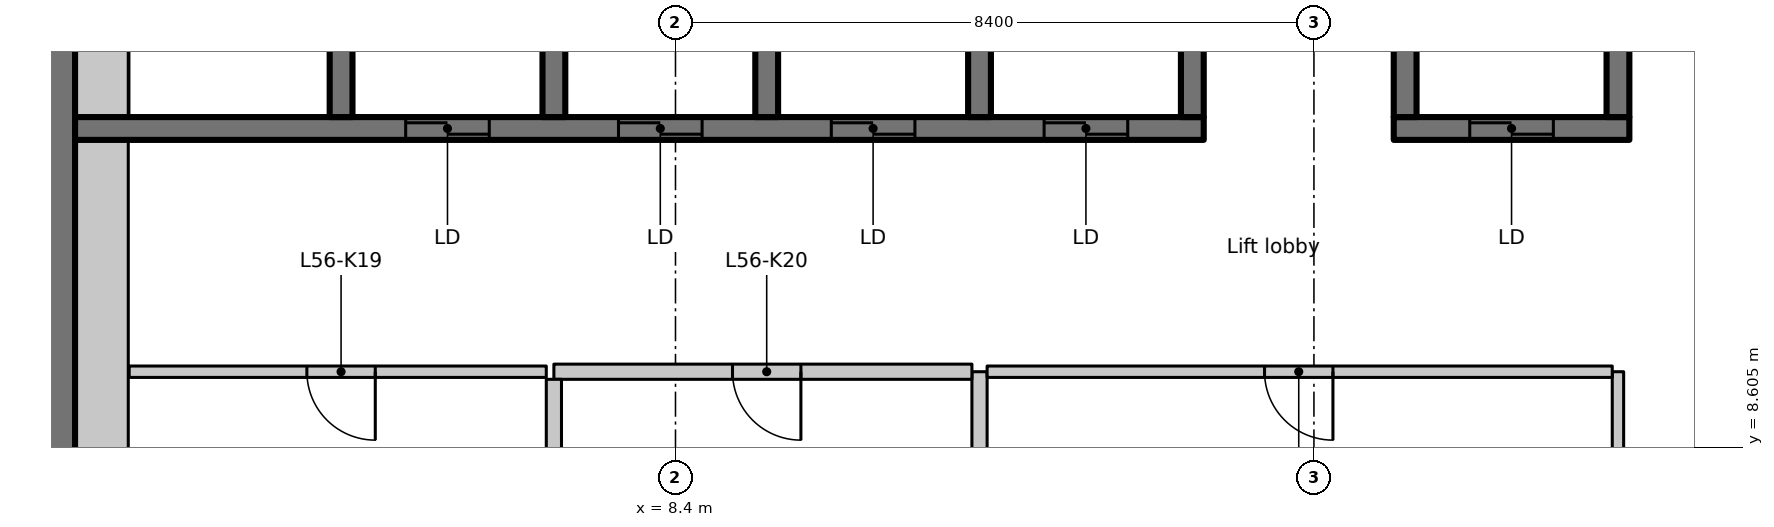
"""IFC4 building model, lengths in metres.
Left out: names, types, materials, properties, quantities, classifications, styles, units other than length and angle.
Written with IfcOpenShell. Run it as: python <this file> out.ifc"""

import sys

from ifc_helpers import new_model, si_unit, direction, frame, frame_2d, origin, place, context, subcontext, project, spatial, rectangle, extrude, element, fill, save


model = new_model("IFC4")
c1 = context("Model", 3, precision=1e-05, world=origin(), true_north=direction((0.0, 1.0)))
c2 = subcontext(c1, "Body", "Model", "MODEL_VIEW")
j1 = project(units=[si_unit("LENGTHUNIT", "METRE"), si_unit("PLANEANGLEUNIT", "RADIAN")], contexts=[c1])
p1 = place(None, origin())
s1 = spatial("IfcSite", under=j1, at=p1, CompositionType="ELEMENT")
p2 = place(p1, origin())
s2 = spatial("IfcBuilding", under=s1, at=p2, CompositionType="ELEMENT")
p3 = place(p2, frame((0.0, 0.0, 222.9)))
s3 = spatial("IfcBuildingStorey", under=s2, at=p3, CompositionType="ELEMENT", Elevation=222.9)
p4 = place(p3, frame((0.25, 7.436, 0.0), z_axis=(0.0, 0.0, 1.0), x_axis=(0.0, 1.0, 0.0)))
e1 = element("IfcWall", 1, at=p4, inside=s3, PredefinedType="SHEAR", context=c2, shape_type="SweptSolid", body=[
    extrude(rectangle(XDim=8.864, YDim=0.5, at=frame_2d((4.432, 0.0))), origin(), (0.0, 0.0, 1.0), 3.35),
])
p5 = place(p3, frame((0.5, 12.8, 0.0), z_axis=(0.0, 0.0, 1.0), x_axis=(1.0, 0.0, 0.0)))
e2 = element("IfcWall", 2, at=p5, inside=s3, PredefinedType="SHEAR", context=c2, shape_type="SweptSolid", body=[
    extrude(rectangle(XDim=14.85, YDim=0.3, at=frame_2d((7.425, 0.0))), origin(), (0.0, 0.0, 1.0), 3.35),
])
p6 = place(p5, frame((4.35, 0.0, 0.0)))
e3 = element("IfcOpeningElement", 3, at=p6, cuts=e2, PredefinedType="OPENING", context=c2, shape_type="SweptSolid", body=[
    extrude(rectangle(XDim=1.1, YDim=2.3, at=frame_2d((0.55, 1.15))), frame((0.0, 0.16, 0.0), z_axis=(0.0, -1.0, 0.0), x_axis=(1.0, 0.0, 0.0)), (0.0, 0.0, 1.0), 0.32),
])
p7 = place(p5, frame((7.15, 0.0, 0.0)))
e4 = element("IfcOpeningElement", 4, at=p7, cuts=e2, PredefinedType="OPENING", context=c2, shape_type="SweptSolid", body=[
    extrude(rectangle(XDim=1.1, YDim=2.3, at=frame_2d((0.55, 1.15))), frame((0.0, 0.16, 0.0), z_axis=(0.0, -1.0, 0.0), x_axis=(1.0, 0.0, 0.0)), (0.0, 0.0, 1.0), 0.32),
])
p8 = place(p5, frame((9.95, 0.0, 0.0)))
e5 = element("IfcOpeningElement", 5, at=p8, cuts=e2, PredefinedType="OPENING", context=c2, shape_type="SweptSolid", body=[
    extrude(rectangle(XDim=1.1, YDim=2.3, at=frame_2d((0.55, 1.15))), frame((0.0, 0.16, 0.0), z_axis=(0.0, -1.0, 0.0), x_axis=(1.0, 0.0, 0.0)), (0.0, 0.0, 1.0), 0.32),
])
p9 = place(p5, frame((12.75, 0.0, 0.0)))
e6 = element("IfcOpeningElement", 6, at=p9, cuts=e2, PredefinedType="OPENING", context=c2, shape_type="SweptSolid", body=[
    extrude(rectangle(XDim=1.1, YDim=2.3, at=frame_2d((0.55, 1.15))), frame((0.0, 0.16, 0.0), z_axis=(0.0, -1.0, 0.0), x_axis=(1.0, 0.0, 0.0)), (0.0, 0.0, 1.0), 0.32),
])
for number, where, z_axis, x_axis in (
    (7, (4.0, 12.95, 0.0), (0.0, 0.0, 1.0), (0.0, 1.0, 0.0)),
    (8, (6.8, 12.95, 0.0), (0.0, 0.0, 1.0), (0.0, 1.0, 0.0)),
    (9, (9.6, 12.95, 0.0), (0.0, 0.0, 1.0), (0.0, 1.0, 0.0)),
    (10, (12.4, 12.95, 0.0), (0.0, 0.0, 1.0), (0.0, 1.0, 0.0)),
    (11, (15.2, 12.95, 0.0), (0.0, 0.0, 1.0), (0.0, 1.0, 0.0)),
):
    element("IfcWall", number, at=place(p3, frame(where, z_axis=z_axis, x_axis=x_axis)), inside=s3, PredefinedType="SHEAR", context=c2, shape_type="SweptSolid", body=[
        extrude(rectangle(XDim=3.35, YDim=0.3, at=frame_2d((1.675, 0.0))), origin(), (0.0, 0.0, 1.0), 3.35),
    ])
p10 = place(p3, frame((17.85, 12.8, 0.0), z_axis=(0.0, 0.0, 1.0), x_axis=(1.0, 0.0, 0.0)))
e12 = element("IfcWall", 12, at=p10, inside=s3, PredefinedType="SHEAR", context=c2, shape_type="SweptSolid", body=[
    extrude(rectangle(XDim=3.1, YDim=0.3, at=frame_2d((1.55, 0.0))), origin(), (0.0, 0.0, 1.0), 3.35),
])
p11 = place(p10, frame((1.0, 0.0, 0.0)))
e13 = element("IfcOpeningElement", 13, at=p11, cuts=e12, PredefinedType="OPENING", context=c2, shape_type="SweptSolid", body=[
    extrude(rectangle(XDim=1.1, YDim=2.3, at=frame_2d((0.55, 1.15))), frame((0.0, 0.16, 0.0), z_axis=(0.0, -1.0, 0.0), x_axis=(1.0, 0.0, 0.0)), (0.0, 0.0, 1.0), 0.32),
])
for number, where, z_axis, x_axis in (
    (14, (18.0, 12.95, 0.0), (0.0, 0.0, 1.0), (0.0, 1.0, 0.0)),
    (15, (20.8, 12.95, 0.0), (0.0, 0.0, 1.0), (0.0, 1.0, 0.0)),
):
    element("IfcWall", number, at=place(p3, frame(where, z_axis=z_axis, x_axis=x_axis)), inside=s3, PredefinedType="SHEAR", context=c2, shape_type="SweptSolid", body=[
        extrude(rectangle(XDim=3.35, YDim=0.3, at=frame_2d((1.675, 0.0))), origin(), (0.0, 0.0, 1.0), 3.35),
    ])
p12 = place(p3, frame((12.4, 7.1, 0.0), z_axis=(0.0, 0.0, 1.0), x_axis=(0.0, 1.0, 0.0)))
e16 = element("IfcWall", 16, at=p12, inside=s3, PredefinedType="PARTITIONING", context=c2, shape_type="SweptSolid", body=[
    extrude(rectangle(XDim=2.5, YDim=0.2, at=frame_2d((1.25, 0.0))), origin(), (0.0, 0.0, 1.0), 3.35),
])
p13 = place(p3, frame((12.3, 9.6, 0.0), z_axis=(0.0, 0.0, 1.0), x_axis=(-1.0, 0.0, 0.0)))
e17 = element("IfcWall", 17, at=p13, inside=s3, PredefinedType="PARTITIONING", context=c2, shape_type="SweptSolid", body=[
    extrude(rectangle(XDim=5.5, YDim=0.2, at=frame_2d((2.75, 0.0))), origin(), (0.0, 0.0, 1.0), 3.35),
])
p14 = place(p13, frame((2.25, 0.0, 0.0)))
e18 = element("IfcOpeningElement", 18, at=p14, cuts=e17, PredefinedType="OPENING", context=c2, shape_type="SweptSolid", body=[
    extrude(rectangle(XDim=0.9, YDim=2.1, at=frame_2d((0.45, 1.05))), frame((0.0, 0.11, 0.0), z_axis=(0.0, -1.0, 0.0), x_axis=(1.0, 0.0, 0.0)), (0.0, 0.0, 1.0), 0.22),
])
p15 = place(p3, frame((6.8, 9.5, 0.0), z_axis=(0.0, 0.0, 1.0), x_axis=(0.0, -1.0, 0.0)))
e19 = element("IfcWall", 19, at=p15, inside=s3, PredefinedType="PARTITIONING", context=c2, shape_type="SweptSolid", body=[
    extrude(rectangle(XDim=2.4, YDim=0.2, at=frame_2d((1.2, 0.0))), origin(), (0.0, 0.0, 1.0), 3.35),
])
p16 = place(p3, frame((6.7, 9.6, 0.0), z_axis=(0.0, 0.0, 1.0), x_axis=(-1.0, 0.0, 0.0)))
e20 = element("IfcWall", 20, at=p16, inside=s3, PredefinedType="PARTITIONING", context=c2, shape_type="SweptSolid", body=[
    extrude(rectangle(XDim=5.488, YDim=0.15, at=frame_2d((2.744, 0.0))), origin(), (0.0, 0.0, 1.0), 3.35),
])
p17 = place(p16, frame((2.25, 0.0, 0.0)))
e21 = element("IfcOpeningElement", 21, at=p17, cuts=e20, PredefinedType="OPENING", context=c2, shape_type="SweptSolid", body=[
    extrude(rectangle(XDim=0.9, YDim=2.1, at=frame_2d((0.45, 1.05))), frame((0.0, 0.085, 0.0), z_axis=(0.0, -1.0, 0.0), x_axis=(1.0, 0.0, 0.0)), (0.0, 0.0, 1.0), 0.17),
])
p18 = place(p3, frame((20.8, 7.075, 0.0), z_axis=(0.0, 0.0, 1.0), x_axis=(0.0, 1.0, 0.0)))
e22 = element("IfcWall", 22, at=p18, inside=s3, PredefinedType="PARTITIONING", context=c2, shape_type="SweptSolid", body=[
    extrude(rectangle(XDim=2.525, YDim=0.15, at=frame_2d((1.263, 0.0))), origin(), (0.0, 0.0, 1.0), 3.35),
])
p19 = place(p3, frame((20.725, 9.6, 0.0), z_axis=(0.0, 0.0, 1.0), x_axis=(-1.0, 0.0, 0.0)))
e23 = element("IfcWall", 23, at=p19, inside=s3, PredefinedType="PARTITIONING", context=c2, shape_type="SweptSolid", body=[
    extrude(rectangle(XDim=8.225, YDim=0.15, at=frame_2d((4.113, 0.0))), origin(), (0.0, 0.0, 1.0), 3.35),
])
p20 = place(p19, frame((3.675, 0.0, 0.0)))
e24 = element("IfcOpeningElement", 24, at=p20, cuts=e23, PredefinedType="OPENING", context=c2, shape_type="SweptSolid", body=[
    extrude(rectangle(XDim=0.9, YDim=2.1, at=frame_2d((0.45, 1.05))), frame((0.0, 0.085, 0.0), z_axis=(0.0, -1.0, 0.0), x_axis=(1.0, 0.0, 0.0)), (0.0, 0.0, 1.0), 0.17),
])
p21 = place(p3, frame((0.85, 7.436, 0.0), z_axis=(0.0, 0.0, 1.0), x_axis=(0.0, 1.0, 0.0)))
e25 = element("IfcWall", 25, at=p21, inside=s3, PredefinedType="PARTITIONING", context=c2, shape_type="SweptSolid", body=[
    extrude(rectangle(XDim=5.214, YDim=0.7, at=frame_2d((2.607, 0.0))), origin(), (0.0, 0.0, 1.0), 3.35),
])
p22 = place(p3, frame((0.85, 12.95, 0.0), z_axis=(0.0, 0.0, 1.0), x_axis=(0.0, 1.0, 0.0)))
e26 = element("IfcWall", 26, at=p22, inside=s3, PredefinedType="PARTITIONING", context=c2, shape_type="SweptSolid", body=[
    extrude(rectangle(XDim=2.65, YDim=0.7, at=frame_2d((1.325, 0.0))), origin(), (0.0, 0.0, 1.0), 3.35),
])
p23 = place(p6, origin())
e27 = element("IfcDoor", 27, at=p23, inside=s3, OperationType="SLIDING_TO_LEFT", PredefinedType="DOOR", context=c2, shape_type="SweptSolid", body=[
    extrude(rectangle(XDim=1.1, YDim=2.3, at=frame_2d((0.55, 1.15))), frame((0.0, 0.025, 0.0), z_axis=(0.0, -1.0, 0.0), x_axis=(1.0, 0.0, 0.0)), (0.0, 0.0, 1.0), 0.05),
])
fill(e3, e27)
p24 = place(p7, origin())
e28 = element("IfcDoor", 28, at=p24, inside=s3, OperationType="SLIDING_TO_LEFT", PredefinedType="DOOR", context=c2, shape_type="SweptSolid", body=[
    extrude(rectangle(XDim=1.1, YDim=2.3, at=frame_2d((0.55, 1.15))), frame((0.0, 0.025, 0.0), z_axis=(0.0, -1.0, 0.0), x_axis=(1.0, 0.0, 0.0)), (0.0, 0.0, 1.0), 0.05),
])
fill(e4, e28)
p25 = place(p8, origin())
e29 = element("IfcDoor", 29, at=p25, inside=s3, OperationType="SLIDING_TO_LEFT", PredefinedType="DOOR", context=c2, shape_type="SweptSolid", body=[
    extrude(rectangle(XDim=1.1, YDim=2.3, at=frame_2d((0.55, 1.15))), frame((0.0, 0.025, 0.0), z_axis=(0.0, -1.0, 0.0), x_axis=(1.0, 0.0, 0.0)), (0.0, 0.0, 1.0), 0.05),
])
fill(e5, e29)
p26 = place(p9, origin())
e30 = element("IfcDoor", 30, at=p26, inside=s3, OperationType="SLIDING_TO_LEFT", PredefinedType="DOOR", context=c2, shape_type="SweptSolid", body=[
    extrude(rectangle(XDim=1.1, YDim=2.3, at=frame_2d((0.55, 1.15))), frame((0.0, 0.025, 0.0), z_axis=(0.0, -1.0, 0.0), x_axis=(1.0, 0.0, 0.0)), (0.0, 0.0, 1.0), 0.05),
])
fill(e6, e30)
p27 = place(p11, origin())
e31 = element("IfcDoor", 31, at=p27, inside=s3, OperationType="SLIDING_TO_LEFT", PredefinedType="DOOR", context=c2, shape_type="SweptSolid", body=[
    extrude(rectangle(XDim=1.1, YDim=2.3, at=frame_2d((0.55, 1.15))), frame((0.0, 0.025, 0.0), z_axis=(0.0, -1.0, 0.0), x_axis=(1.0, 0.0, 0.0)), (0.0, 0.0, 1.0), 0.05),
])
fill(e13, e31)
p28 = place(p17, origin())
e32 = element("IfcDoor", 32, at=p28, inside=s3, OperationType="SINGLE_SWING_RIGHT", PredefinedType="DOOR", context=c2, shape_type="SweptSolid", body=[
    extrude(rectangle(XDim=0.9, YDim=2.1, at=frame_2d((0.45, 1.05))), frame((0.0, 0.025, 0.0), z_axis=(0.0, -1.0, 0.0), x_axis=(1.0, 0.0, 0.0)), (0.0, 0.0, 1.0), 0.05),
])
fill(e21, e32)
p29 = place(p14, origin())
e33 = element("IfcDoor", 33, at=p29, inside=s3, OperationType="SINGLE_SWING_LEFT", PredefinedType="DOOR", context=c2, shape_type="SweptSolid", body=[
    extrude(rectangle(XDim=0.9, YDim=2.1, at=frame_2d((0.45, 1.05))), frame((0.0, 0.025, 0.0), z_axis=(0.0, -1.0, 0.0), x_axis=(1.0, 0.0, 0.0)), (0.0, 0.0, 1.0), 0.05),
])
fill(e18, e33)
p30 = place(p20, origin())
e34 = element("IfcDoor", 34, at=p30, inside=s3, OperationType="SINGLE_SWING_RIGHT", PredefinedType="DOOR", context=c2, shape_type="SweptSolid", body=[
    extrude(rectangle(XDim=0.9, YDim=2.1, at=frame_2d((0.45, 1.05))), frame((0.0, 0.025, 0.0), z_axis=(0.0, -1.0, 0.0), x_axis=(1.0, 0.0, 0.0)), (0.0, 0.0, 1.0), 0.05),
])
fill(e24, e34)
save(model, sys.argv[1])
